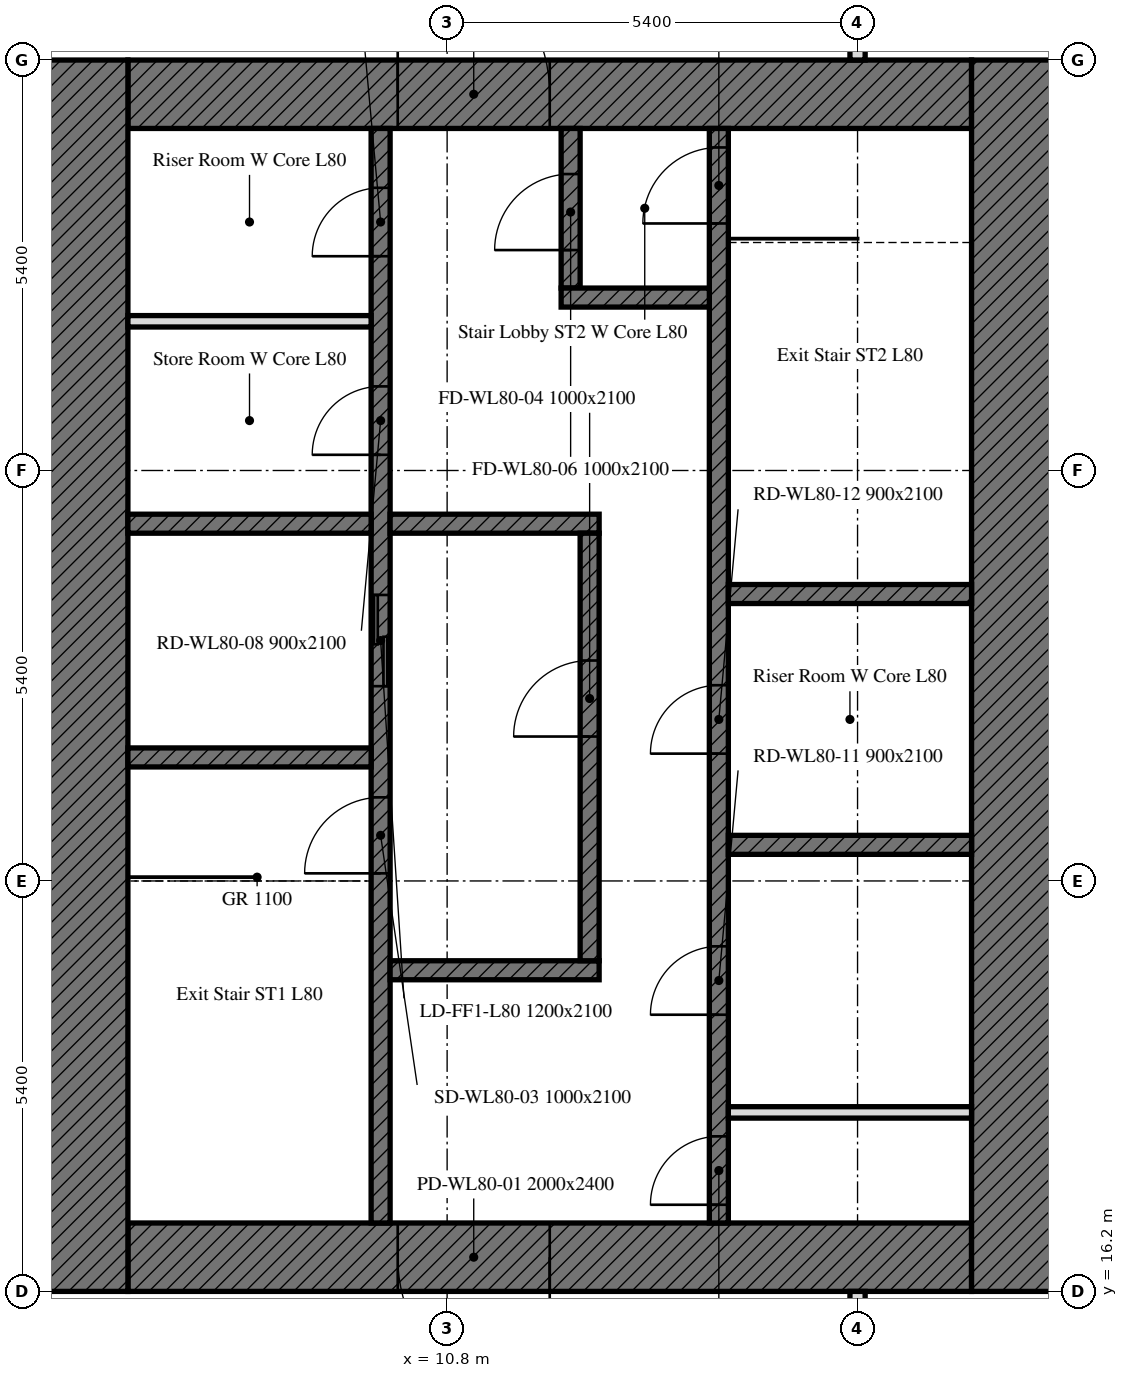
"""IFC4 building model, lengths in metres.
Left out: names, types, materials, properties, quantities, classifications, styles, units other than length and angle.
Written with IfcOpenShell. Run it as: python <this file> out.ifc"""

import sys

from ifc_helpers import new_model, si_unit, direction, frame, frame_2d, origin, place, context, subcontext, project, spatial, polyline, rectangle, outline, extrude, element, fill, save


model = new_model("IFC4")
c1 = context("Model", 3, precision=1e-05, world=origin(), true_north=direction((0.0, 1.0)))
c2 = subcontext(c1, "Body", "Model", "MODEL_VIEW")
j1 = project(units=[si_unit("LENGTHUNIT", "METRE"), si_unit("PLANEANGLEUNIT", "RADIAN")], contexts=[c1])
p1 = place(None, origin())
s1 = spatial("IfcSite", under=j1, at=p1, CompositionType="ELEMENT")
p2 = place(p1, origin())
s2 = spatial("IfcBuilding", under=s1, at=p2, CompositionType="ELEMENT")
p3 = place(p2, frame((0.0, 0.0, 321.7)))
s3 = spatial("IfcBuildingStorey", under=s2, at=p3, CompositionType="ELEMENT", Elevation=321.7)
p4 = place(p3, frame((17.7, 16.65, 0.0), z_axis=(0.0, 0.0, 1.0), x_axis=(-1.0, 0.0, 0.0)))
e1 = element("IfcWall", 1, at=p4, inside=s3, PredefinedType="SOLIDWALL", context=c2, shape_type="SweptSolid", body=[
    extrude(outline(polyline([(0.0, 0.0), (11.1, 0.0), (11.1, 5.933), (0.0, 4.2), (0.0, 0.0)])), frame((0.0, 0.45, 0.0), z_axis=(0.0, -1.0, 0.0), x_axis=(1.0, 0.0, 0.0)), (0.0, 0.0, 1.0), 0.9),
])
p5 = place(p4, frame((5.55, 0.0, 0.0)))
e2 = element("IfcOpeningElement", 2, at=p5, cuts=e1, PredefinedType="OPENING", context=c2, shape_type="SweptSolid", body=[
    extrude(rectangle(XDim=2.0, YDim=2.4, at=frame_2d((1.0, 1.2))), frame((0.0, 0.45, 0.0), z_axis=(0.0, -1.0, 0.0), x_axis=(1.0, 0.0, 0.0)), (0.0, 0.0, 1.0), 0.9),
])
p6 = place(p3, frame((6.6, 31.95, 0.0), z_axis=(0.0, 0.0, 1.0), x_axis=(1.0, 0.0, 0.0)))
e3 = element("IfcWall", 3, at=p6, inside=s3, PredefinedType="SOLIDWALL", context=c2, shape_type="SweptSolid", body=[
    extrude(outline(polyline([(0.0, 0.0), (11.1, 0.0), (11.1, 4.2), (0.0, 5.933), (0.0, 0.0)])), frame((0.0, 0.45, 0.0), z_axis=(0.0, -1.0, 0.0), x_axis=(1.0, 0.0, 0.0)), (0.0, 0.0, 1.0), 0.9),
])
p7 = place(p6, frame((3.55, 0.0, 0.0)))
e4 = element("IfcOpeningElement", 4, at=p7, cuts=e3, PredefinedType="OPENING", context=c2, shape_type="SweptSolid", body=[
    extrude(rectangle(XDim=2.0, YDim=2.4, at=frame_2d((1.0, 1.2))), frame((0.0, 0.45, 0.0), z_axis=(0.0, -1.0, 0.0), x_axis=(1.0, 0.0, 0.0)), (0.0, 0.0, 1.0), 0.9),
])
p8 = place(p3, frame((6.0, 16.2, 0.0), z_axis=(0.0, 0.0, 1.0), x_axis=(0.0, 1.0, 0.0)))
e5 = element("IfcWall", 5, at=p8, inside=s3, PredefinedType="SOLIDWALL", context=c2, shape_type="SweptSolid", body=[
    extrude(rectangle(XDim=16.2, YDim=1.2, at=frame_2d((8.1, 0.0))), origin(), (0.0, 0.0, 1.0), 5.667),
])
p9 = place(p3, frame((18.3, 32.4, 0.0), z_axis=(0.0, 0.0, 1.0), x_axis=(0.0, -1.0, 0.0)))
e6 = element("IfcWall", 6, at=p9, inside=s3, PredefinedType="SOLIDWALL", context=c2, shape_type="SweptSolid", body=[
    extrude(rectangle(XDim=16.2, YDim=1.2, at=frame_2d((8.1, 0.0))), origin(), (0.0, 0.0, 1.0), 4.2),
])
p10 = place(p3, frame((9.925, 17.1, 0.0), z_axis=(0.0, 0.0, 1.0), x_axis=(0.0, 1.0, 0.0)))
e7 = element("IfcWall", 7, at=p10, inside=s3, PredefinedType="SOLIDWALL", context=c2, shape_type="SweptSolid", body=[
    extrude(rectangle(XDim=14.4, YDim=0.25, at=frame_2d((7.2, 0.0))), origin(), (0.0, 0.0, 1.0), 4.2),
])
p11 = place(p10, frame((4.6, 0.0, 0.0)))
e8 = element("IfcOpeningElement", 8, at=p11, cuts=e7, PredefinedType="OPENING", context=c2, shape_type="SweptSolid", body=[
    extrude(rectangle(XDim=1.0, YDim=2.1, at=frame_2d((0.5, 1.05))), frame((0.0, 0.125, 0.0), z_axis=(0.0, -1.0, 0.0), x_axis=(1.0, 0.0, 0.0)), (0.0, 0.0, 1.0), 0.25),
])
p12 = place(p10, frame((7.062, 0.0, 0.0)))
e9 = element("IfcOpeningElement", 9, at=p12, cuts=e7, PredefinedType="OPENING", context=c2, shape_type="SweptSolid", body=[
    extrude(rectangle(XDim=1.2, YDim=2.1, at=frame_2d((0.6, 1.05))), frame((0.0, 0.125, 0.0), z_axis=(0.0, -1.0, 0.0), x_axis=(1.0, 0.0, 0.0)), (0.0, 0.0, 1.0), 0.25),
])
p13 = place(p10, frame((10.106, 0.0, 0.0)))
e10 = element("IfcOpeningElement", 10, at=p13, cuts=e7, PredefinedType="OPENING", context=c2, shape_type="SweptSolid", body=[
    extrude(rectangle(XDim=0.9, YDim=2.1, at=frame_2d((0.45, 1.05))), frame((0.0, 0.125, 0.0), z_axis=(0.0, -1.0, 0.0), x_axis=(1.0, 0.0, 0.0)), (0.0, 0.0, 1.0), 0.25),
])
p14 = place(p10, frame((12.719, 0.0, 0.0)))
e11 = element("IfcOpeningElement", 11, at=p14, cuts=e7, PredefinedType="OPENING", context=c2, shape_type="SweptSolid", body=[
    extrude(rectangle(XDim=0.9, YDim=2.1, at=frame_2d((0.45, 1.05))), frame((0.0, 0.125, 0.0), z_axis=(0.0, -1.0, 0.0), x_axis=(1.0, 0.0, 0.0)), (0.0, 0.0, 1.0), 0.25),
])
p15 = place(p3, frame((14.375, 17.1, 0.0), z_axis=(0.0, 0.0, 1.0), x_axis=(0.0, 1.0, 0.0)))
e12 = element("IfcWall", 12, at=p15, inside=s3, PredefinedType="SOLIDWALL", context=c2, shape_type="SweptSolid", body=[
    extrude(rectangle(XDim=14.4, YDim=0.25, at=frame_2d((7.2, 0.0))), origin(), (0.0, 0.0, 1.0), 4.2),
])
p16 = place(p15, frame((13.15, 0.0, 0.0)))
e13 = element("IfcOpeningElement", 13, at=p16, cuts=e12, PredefinedType="OPENING", context=c2, shape_type="SweptSolid", body=[
    extrude(rectangle(XDim=1.0, YDim=2.1, at=frame_2d((0.5, 1.05))), frame((0.0, 0.125, 0.0), z_axis=(0.0, -1.0, 0.0), x_axis=(1.0, 0.0, 0.0)), (0.0, 0.0, 1.0), 0.25),
])
p17 = place(p15, frame((0.24, 0.0, 0.0)))
e14 = element("IfcOpeningElement", 14, at=p17, cuts=e12, PredefinedType="OPENING", context=c2, shape_type="SweptSolid", body=[
    extrude(rectangle(XDim=0.9, YDim=2.1, at=frame_2d((0.45, 1.05))), frame((0.0, 0.125, 0.0), z_axis=(0.0, -1.0, 0.0), x_axis=(1.0, 0.0, 0.0)), (0.0, 0.0, 1.0), 0.25),
])
p18 = place(p15, frame((2.74, 0.0, 0.0)))
e15 = element("IfcOpeningElement", 15, at=p18, cuts=e12, PredefinedType="OPENING", context=c2, shape_type="SweptSolid", body=[
    extrude(rectangle(XDim=0.9, YDim=2.1, at=frame_2d((0.45, 1.05))), frame((0.0, 0.125, 0.0), z_axis=(0.0, -1.0, 0.0), x_axis=(1.0, 0.0, 0.0)), (0.0, 0.0, 1.0), 0.25),
])
p19 = place(p15, frame((6.175, 0.0, 0.0)))
e16 = element("IfcOpeningElement", 16, at=p19, cuts=e12, PredefinedType="OPENING", context=c2, shape_type="SweptSolid", body=[
    extrude(rectangle(XDim=0.9, YDim=2.1, at=frame_2d((0.45, 1.05))), frame((0.0, 0.125, 0.0), z_axis=(0.0, -1.0, 0.0), x_axis=(1.0, 0.0, 0.0)), (0.0, 0.0, 1.0), 0.25),
])
p20 = place(p3, frame((6.6, 23.225, 0.0), z_axis=(0.0, 0.0, 1.0), x_axis=(1.0, 0.0, 0.0)))
e17 = element("IfcWall", 17, at=p20, inside=s3, PredefinedType="SOLIDWALL", context=c2, shape_type="SweptSolid", body=[
    extrude(outline(polyline([(0.0, 0.0), (3.2, 0.0), (3.2, 4.2), (0.0, 5.933), (0.0, 0.0)])), frame((0.0, 0.125, 0.0), z_axis=(0.0, -1.0, 0.0), x_axis=(1.0, 0.0, 0.0)), (0.0, 0.0, 1.0), 0.25),
])
for number, where, z_axis, x_axis in (
    (18, (14.5, 25.375, 0.0), (0.0, 0.0, 1.0), (1.0, 0.0, 0.0)),
    (19, (14.5, 22.075, 0.0), (0.0, 0.0, 1.0), (1.0, 0.0, 0.0)),
):
    element("IfcWall", number, at=place(p3, frame(where, z_axis=z_axis, x_axis=x_axis)), inside=s3, PredefinedType="SOLIDWALL", context=c2, shape_type="SweptSolid", body=[
        extrude(rectangle(XDim=3.2, YDim=0.25, at=frame_2d((1.6, 0.0))), origin(), (0.0, 0.0, 1.0), 4.2),
    ])
p21 = place(p3, frame((6.6, 26.3, 0.0), z_axis=(0.0, 0.0, 1.0), x_axis=(1.0, 0.0, 0.0)))
e20 = element("IfcWall", 20, at=p21, inside=s3, PredefinedType="SOLIDWALL", context=c2, shape_type="SweptSolid", body=[
    extrude(outline(polyline([(0.0, 0.0), (3.2, 0.0), (3.2, 4.2), (0.0, 5.933), (0.0, 0.0)])), frame((0.0, 0.125, 0.0), z_axis=(0.0, -1.0, 0.0), x_axis=(1.0, 0.0, 0.0)), (0.0, 0.0, 1.0), 0.25),
])
for number, where, z_axis, x_axis in (
    (21, (10.05, 26.3, 0.0), (0.0, 0.0, 1.0), (1.0, 0.0, 0.0)),
    (22, (10.05, 20.425, 0.0), (0.0, 0.0, 1.0), (1.0, 0.0, 0.0)),
):
    element("IfcWall", number, at=place(p3, frame(where, z_axis=z_axis, x_axis=x_axis)), inside=s3, PredefinedType="SOLIDWALL", context=c2, shape_type="SweptSolid", body=[
        extrude(rectangle(XDim=2.75, YDim=0.25, at=frame_2d((1.375, 0.0))), origin(), (0.0, 0.0, 1.0), 4.2),
    ])
p22 = place(p3, frame((12.425, 29.4, 0.0), z_axis=(0.0, 0.0, 1.0), x_axis=(0.0, 1.0, 0.0)))
e23 = element("IfcWall", 23, at=p22, inside=s3, PredefinedType="SOLIDWALL", context=c2, shape_type="SweptSolid", body=[
    extrude(rectangle(XDim=2.1, YDim=0.25, at=frame_2d((1.05, 0.0))), origin(), (0.0, 0.0, 1.0), 4.2),
])
p23 = place(p22, frame((0.5, 0.0, 0.0)))
e24 = element("IfcOpeningElement", 24, at=p23, cuts=e23, PredefinedType="OPENING", context=c2, shape_type="SweptSolid", body=[
    extrude(rectangle(XDim=1.0, YDim=2.1, at=frame_2d((0.5, 1.05))), frame((0.0, 0.125, 0.0), z_axis=(0.0, -1.0, 0.0), x_axis=(1.0, 0.0, 0.0)), (0.0, 0.0, 1.0), 0.25),
])
p24 = place(p3, frame((12.3, 29.275, 0.0), z_axis=(0.0, 0.0, 1.0), x_axis=(1.0, 0.0, 0.0)))
e25 = element("IfcWall", 25, at=p24, inside=s3, PredefinedType="SOLIDWALL", context=c2, shape_type="SweptSolid", body=[
    extrude(rectangle(XDim=1.95, YDim=0.25, at=frame_2d((0.975, 0.0))), origin(), (0.0, 0.0, 1.0), 4.2),
])
p25 = place(p3, frame((12.675, 20.55, 0.0), z_axis=(0.0, 0.0, 1.0), x_axis=(0.0, 1.0, 0.0)))
e26 = element("IfcWall", 26, at=p25, inside=s3, PredefinedType="SOLIDWALL", context=c2, shape_type="SweptSolid", body=[
    extrude(rectangle(XDim=5.625, YDim=0.25, at=frame_2d((2.812, 0.0))), origin(), (0.0, 0.0, 1.0), 4.2),
])
p26 = place(p25, frame((2.95, 0.0, 0.0)))
e27 = element("IfcOpeningElement", 27, at=p26, cuts=e26, PredefinedType="OPENING", context=c2, shape_type="SweptSolid", body=[
    extrude(rectangle(XDim=1.0, YDim=2.1, at=frame_2d((0.5, 1.05))), frame((0.0, 0.125, 0.0), z_axis=(0.0, -1.0, 0.0), x_axis=(1.0, 0.0, 0.0)), (0.0, 0.0, 1.0), 0.25),
])
p27 = place(p3, frame((6.6, 28.963, 0.0), z_axis=(0.0, 0.0, 1.0), x_axis=(1.0, 0.0, 0.0)))
e28 = element("IfcWall", 28, at=p27, inside=s3, PredefinedType="PARTITIONING", context=c2, shape_type="SweptSolid", body=[
    extrude(outline(polyline([(0.0, 0.0), (3.2, 0.0), (3.2, 4.2), (0.0, 5.933), (0.0, 0.0)])), frame((0.0, 0.075, 0.0), z_axis=(0.0, -1.0, 0.0), x_axis=(1.0, 0.0, 0.0)), (0.0, 0.0, 1.0), 0.15),
])
p28 = place(p3, frame((14.5, 18.555, 0.0), z_axis=(0.0, 0.0, 1.0), x_axis=(1.0, 0.0, 0.0)))
e29 = element("IfcWall", 29, at=p28, inside=s3, PredefinedType="PARTITIONING", context=c2, shape_type="SweptSolid", body=[
    extrude(rectangle(XDim=3.2, YDim=0.15, at=frame_2d((1.6, 0.0))), origin(), (0.0, 0.0, 1.0), 4.2),
])
p29 = place(p3, frame((16.2, 37.505, 0.0), z_axis=(0.0, 0.0, 1.0), x_axis=(0.0, -1.0, 0.0)))
e30 = element("IfcWall", 30, at=p29, inside=s3, PredefinedType="PARTITIONING", context=c2, shape_type="SweptSolid", body=[
    extrude(rectangle(XDim=5.105, YDim=0.2, at=frame_2d((2.552, 0.0))), origin(), (0.0, 0.0, 1.0), 3.45),
])
p30 = place(p3, frame((16.2, 16.2, 0.0), z_axis=(0.0, 0.0, 1.0), x_axis=(0.0, -1.0, 0.0)))
e31 = element("IfcWall", 31, at=p30, inside=s3, PredefinedType="PARTITIONING", context=c2, shape_type="SweptSolid", body=[
    extrude(rectangle(XDim=3.05, YDim=0.2, at=frame_2d((1.525, 0.0))), origin(), (0.0, 0.0, 1.0), 4.2),
])
p31 = place(p5, origin())
e32 = element("IfcDoor", 32, at=p31, inside=s3, OperationType="DOUBLE_DOOR_SINGLE_SWING", PredefinedType="DOOR", context=c2, shape_type="SweptSolid", body=[
    extrude(rectangle(XDim=2.0, YDim=2.4, at=frame_2d((1.0, 1.2))), frame((0.0, 0.025, 0.0), z_axis=(0.0, -1.0, 0.0), x_axis=(1.0, 0.0, 0.0)), (0.0, 0.0, 1.0), 0.05),
])
fill(e2, e32)
p32 = place(p7, origin())
e33 = element("IfcDoor", 33, at=p32, inside=s3, OperationType="DOUBLE_DOOR_SINGLE_SWING", PredefinedType="DOOR", context=c2, shape_type="SweptSolid", body=[
    extrude(rectangle(XDim=2.0, YDim=2.4, at=frame_2d((1.0, 1.2))), frame((0.0, 0.025, 0.0), z_axis=(0.0, -1.0, 0.0), x_axis=(1.0, 0.0, 0.0)), (0.0, 0.0, 1.0), 0.05),
])
fill(e4, e33)
p33 = place(p11, origin())
e34 = element("IfcDoor", 34, at=p33, inside=s3, OperationType="SINGLE_SWING_LEFT", PredefinedType="DOOR", context=c2, shape_type="SweptSolid", body=[
    extrude(rectangle(XDim=1.0, YDim=2.1, at=frame_2d((0.5, 1.05))), frame((0.0, 0.025, 0.0), z_axis=(0.0, -1.0, 0.0), x_axis=(1.0, 0.0, 0.0)), (0.0, 0.0, 1.0), 0.05),
])
fill(e8, e34)
p34 = place(p26, origin())
e35 = element("IfcDoor", 35, at=p34, inside=s3, OperationType="SINGLE_SWING_LEFT", PredefinedType="DOOR", context=c2, shape_type="SweptSolid", body=[
    extrude(rectangle(XDim=1.0, YDim=2.1, at=frame_2d((0.5, 1.05))), frame((0.0, 0.025, 0.0), z_axis=(0.0, -1.0, 0.0), x_axis=(1.0, 0.0, 0.0)), (0.0, 0.0, 1.0), 0.05),
])
fill(e27, e35)
p35 = place(p16, origin())
e36 = element("IfcDoor", 36, at=p35, inside=s3, OperationType="SINGLE_SWING_LEFT", PredefinedType="DOOR", context=c2, shape_type="SweptSolid", body=[
    extrude(rectangle(XDim=1.0, YDim=2.1, at=frame_2d((0.5, 1.05))), frame((0.0, 0.025, 0.0), z_axis=(0.0, -1.0, 0.0), x_axis=(1.0, 0.0, 0.0)), (0.0, 0.0, 1.0), 0.05),
])
fill(e13, e36)
p36 = place(p23, origin())
e37 = element("IfcDoor", 37, at=p36, inside=s3, OperationType="SINGLE_SWING_LEFT", PredefinedType="DOOR", context=c2, shape_type="SweptSolid", body=[
    extrude(rectangle(XDim=1.0, YDim=2.1, at=frame_2d((0.5, 1.05))), frame((0.0, 0.025, 0.0), z_axis=(0.0, -1.0, 0.0), x_axis=(1.0, 0.0, 0.0)), (0.0, 0.0, 1.0), 0.05),
])
fill(e24, e37)
p37 = place(p12, origin())
e38 = element("IfcDoor", 38, at=p37, inside=s3, OperationType="DOUBLE_DOOR_SLIDING", PredefinedType="DOOR", context=c2, shape_type="SweptSolid", body=[
    extrude(rectangle(XDim=1.2, YDim=2.1, at=frame_2d((0.6, 1.05))), frame((0.0, 0.025, 0.0), z_axis=(0.0, -1.0, 0.0), x_axis=(1.0, 0.0, 0.0)), (0.0, 0.0, 1.0), 0.05),
])
fill(e9, e38)
p38 = place(p13, origin())
e39 = element("IfcDoor", 39, at=p38, inside=s3, OperationType="SINGLE_SWING_LEFT", PredefinedType="DOOR", context=c2, shape_type="SweptSolid", body=[
    extrude(rectangle(XDim=0.9, YDim=2.1, at=frame_2d((0.45, 1.05))), frame((0.0, 0.025, 0.0), z_axis=(0.0, -1.0, 0.0), x_axis=(1.0, 0.0, 0.0)), (0.0, 0.0, 1.0), 0.05),
])
fill(e10, e39)
p39 = place(p14, origin())
e40 = element("IfcDoor", 40, at=p39, inside=s3, OperationType="SINGLE_SWING_LEFT", PredefinedType="DOOR", context=c2, shape_type="SweptSolid", body=[
    extrude(rectangle(XDim=0.9, YDim=2.1, at=frame_2d((0.45, 1.05))), frame((0.0, 0.025, 0.0), z_axis=(0.0, -1.0, 0.0), x_axis=(1.0, 0.0, 0.0)), (0.0, 0.0, 1.0), 0.05),
])
fill(e11, e40)
p40 = place(p17, origin())
e41 = element("IfcDoor", 41, at=p40, inside=s3, OperationType="SINGLE_SWING_LEFT", PredefinedType="DOOR", context=c2, shape_type="SweptSolid", body=[
    extrude(rectangle(XDim=0.9, YDim=2.1, at=frame_2d((0.45, 1.05))), frame((0.0, 0.025, 0.0), z_axis=(0.0, -1.0, 0.0), x_axis=(1.0, 0.0, 0.0)), (0.0, 0.0, 1.0), 0.05),
])
fill(e14, e41)
p41 = place(p18, origin())
e42 = element("IfcDoor", 42, at=p41, inside=s3, OperationType="SINGLE_SWING_LEFT", PredefinedType="DOOR", context=c2, shape_type="SweptSolid", body=[
    extrude(rectangle(XDim=0.9, YDim=2.1, at=frame_2d((0.45, 1.05))), frame((0.0, 0.025, 0.0), z_axis=(0.0, -1.0, 0.0), x_axis=(1.0, 0.0, 0.0)), (0.0, 0.0, 1.0), 0.05),
])
fill(e15, e42)
p42 = place(p19, origin())
e43 = element("IfcDoor", 43, at=p42, inside=s3, OperationType="SINGLE_SWING_LEFT", PredefinedType="DOOR", context=c2, shape_type="SweptSolid", body=[
    extrude(rectangle(XDim=0.9, YDim=2.1, at=frame_2d((0.45, 1.05))), frame((0.0, 0.025, 0.0), z_axis=(0.0, -1.0, 0.0), x_axis=(1.0, 0.0, 0.0)), (0.0, 0.0, 1.0), 0.05),
])
fill(e16, e43)
save(model, sys.argv[1])
